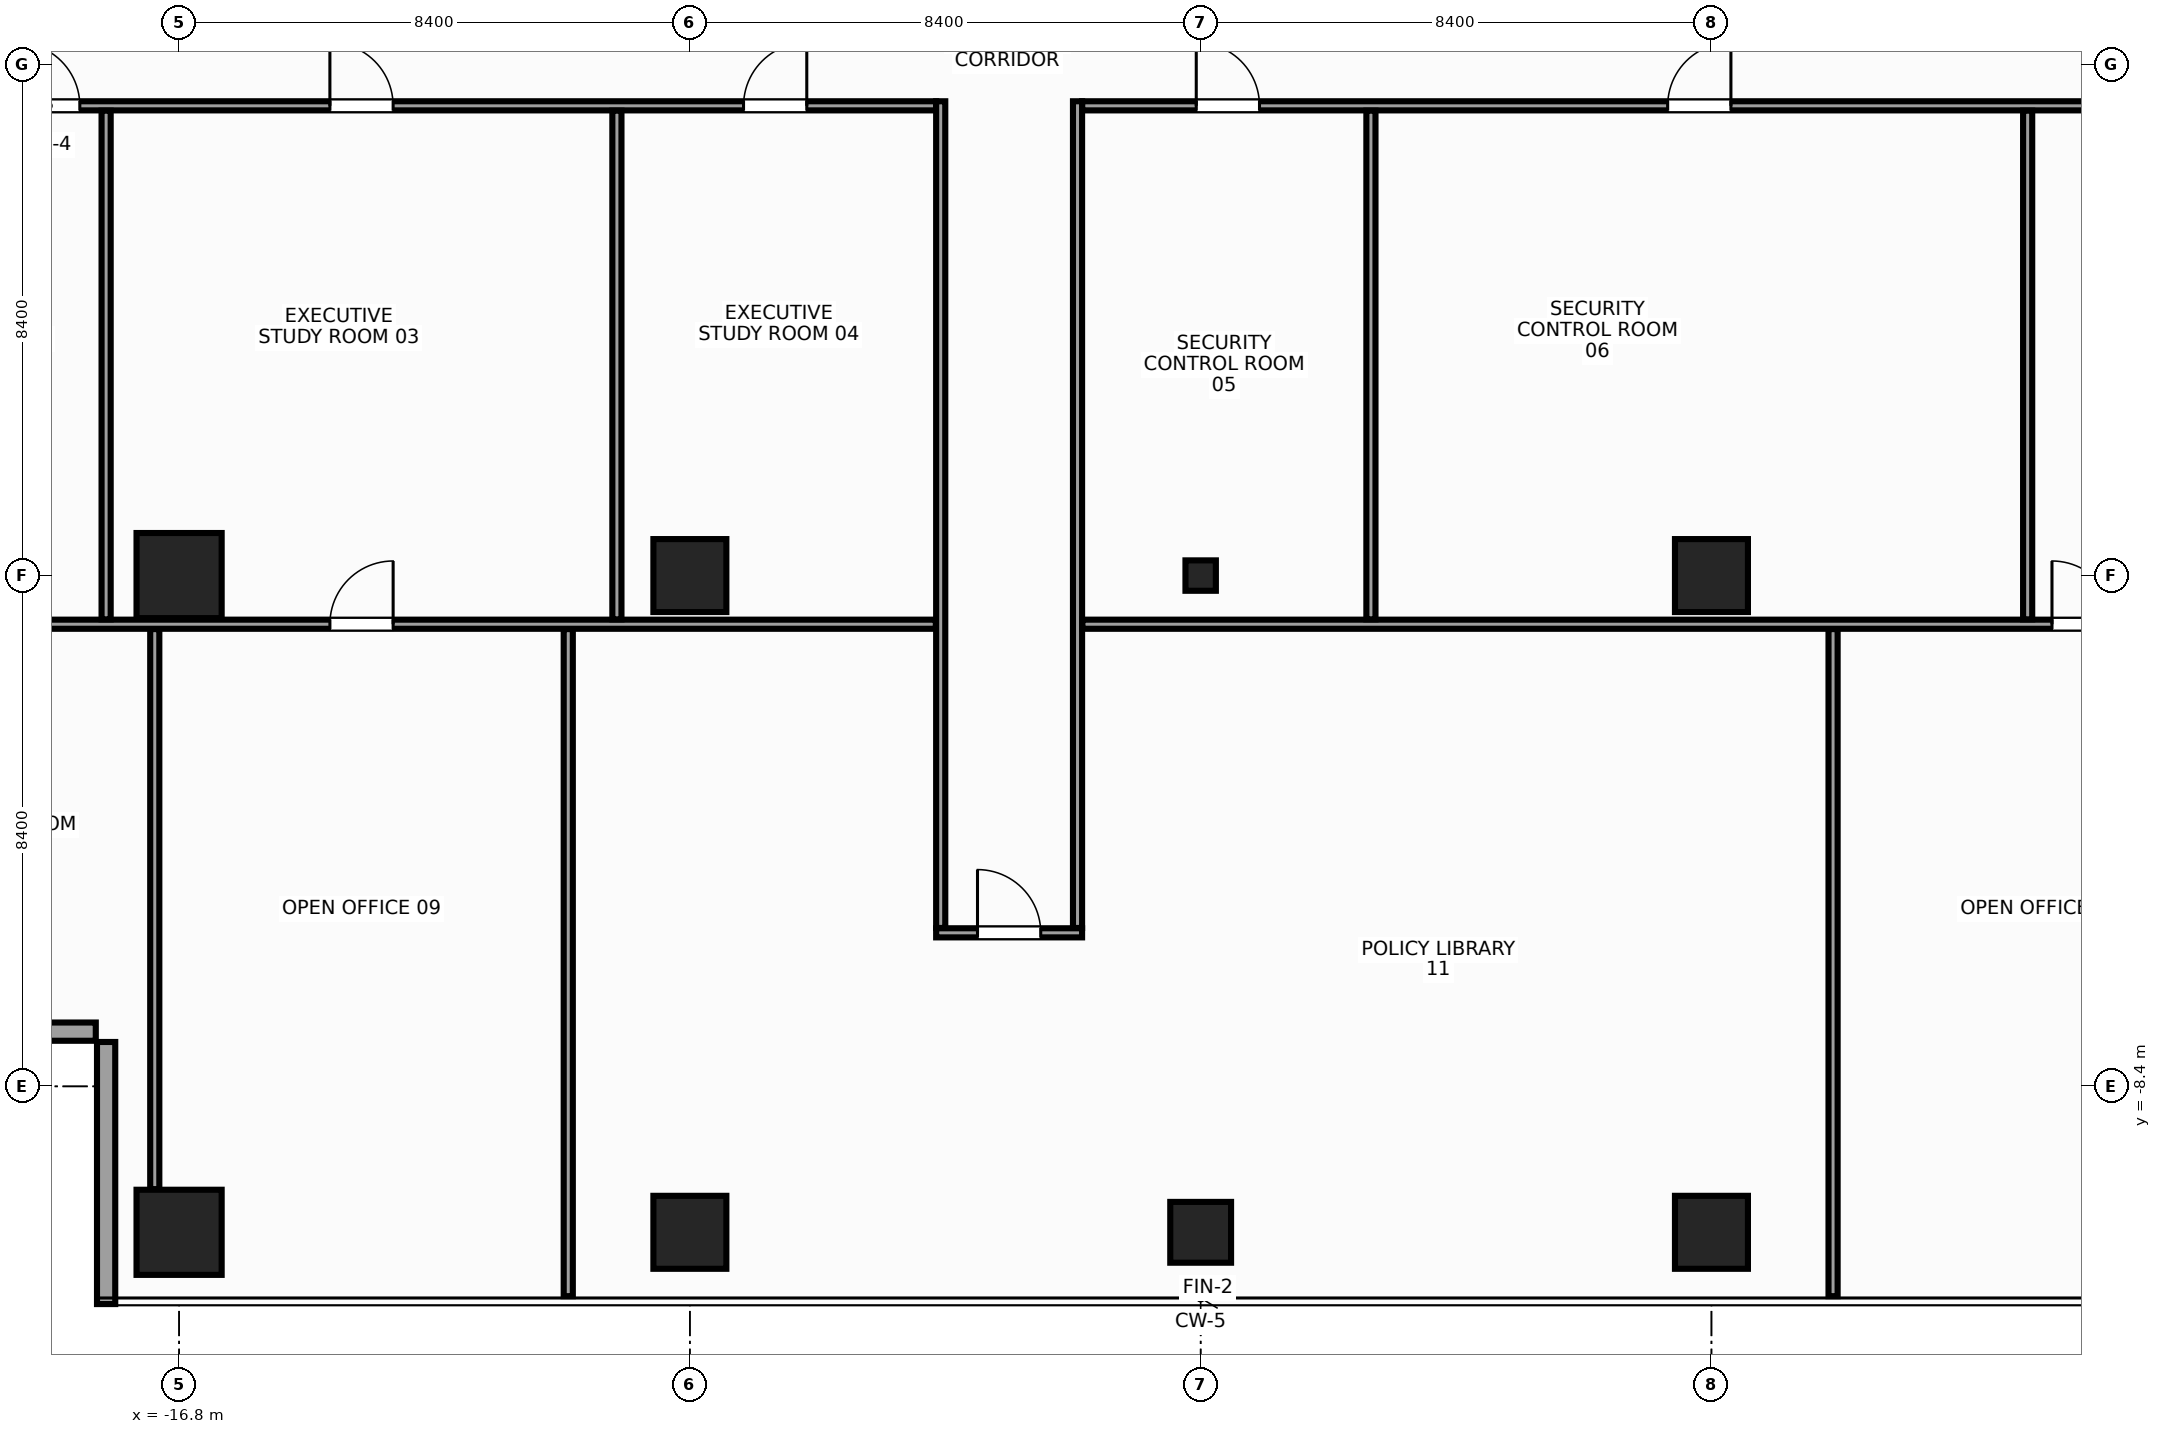
"""IFC4 building model, lengths in metres.
Left out: names, types, materials, properties, quantities, classifications, styles, units other than length and angle.
Written with IfcOpenShell. Run it as: python <this file> out.ifc"""

import sys

from ifc_helpers import new_model, si_unit, direction, frame, frame_2d, origin, origin_with_axes, origin_2d, place, context, subcontext, project, spatial, rectangle, hollow_rectangle, extrude, source, transform, mapped, element, fill, save


model = new_model("IFC4")
c1 = context("Model", 3, precision=1e-05, world=origin(), true_north=direction((0.0, 1.0)))
c2 = subcontext(c1, "Body", "Model", "MODEL_VIEW")
j1 = project(units=[si_unit("LENGTHUNIT", "METRE"), si_unit("PLANEANGLEUNIT", "RADIAN")], contexts=[c1])
p1 = place(None, origin())
s1 = spatial("IfcSite", under=j1, at=p1, CompositionType="ELEMENT")
p2 = place(p1, origin())
s2 = spatial("IfcBuilding", under=s1, at=p2, CompositionType="ELEMENT")
p3 = place(p2, frame((0.0, 0.0, 246.8)))
s3 = spatial("IfcBuildingStorey", under=s2, at=p3, CompositionType="ELEMENT", Elevation=246.8)
m1 = source(origin(), c2, "Body", "SweptSolid", [
    extrude(rectangle(XDim=1.4, YDim=1.4, at=origin_2d()), origin(), (0.0, 0.0, 1.0), 3.6),
])
for number, where, z_axis, x_axis in (
    (1, (-16.8, -10.8, 0.0), (0.0, 0.0, 1.0), (1.0, 0.0, 0.0)),
    (2, (-16.8, 0.0, 0.0), (0.0, 0.0, 1.0), (1.0, 0.0, 0.0)),
):
    element("IfcColumn", number, at=place(p3, frame(where, z_axis=z_axis, x_axis=x_axis)), inside=s3, PredefinedType="COLUMN", context=c2, shape_type="MappedRepresentation", body=[
        mapped(m1, transform((0.0, 0.0, 0.0), x_axis=(1.0, 0.0, 0.0), y_axis=(0.0, 1.0, 0.0), z_axis=(0.0, 0.0, 1.0), scale=1.0)),
    ])
m2 = source(origin(), c2, "Body", "SweptSolid", [
    extrude(rectangle(XDim=1.2, YDim=1.2, at=origin_2d()), origin(), (0.0, 0.0, 1.0), 3.6),
])
for number, where, z_axis, x_axis in (
    (3, (-8.4, 0.0, 0.0), (0.0, 0.0, 1.0), (1.0, 0.0, 0.0)),
    (4, (-8.4, -10.8, 0.0), (0.0, 0.0, 1.0), (1.0, 0.0, 0.0)),
    (5, (8.4, 0.0, 0.0), (0.0, 0.0, 1.0), (1.0, 0.0, 0.0)),
    (6, (8.4, -10.8, 0.0), (0.0, 0.0, 1.0), (1.0, 0.0, 0.0)),
):
    element("IfcColumn", number, at=place(p3, frame(where, z_axis=z_axis, x_axis=x_axis)), inside=s3, PredefinedType="COLUMN", context=c2, shape_type="MappedRepresentation", body=[
        mapped(m2, transform((0.0, 0.0, 0.0), x_axis=(1.0, 0.0, 0.0), y_axis=(0.0, 1.0, 0.0), z_axis=(0.0, 0.0, 1.0), scale=1.0)),
    ])
m3 = source(origin(), c2, "Body", "SweptSolid", [
    extrude(rectangle(XDim=1.0, YDim=1.0, at=origin_2d()), origin(), (0.0, 0.0, 1.0), 3.6),
])
p4 = place(p3, frame((0.0, -10.8, 0.0), z_axis=(0.0, 0.0, 1.0), x_axis=(1.0, 0.0, 0.0)))
e7 = element("IfcColumn", 7, at=p4, inside=s3, PredefinedType="COLUMN", context=c2, shape_type="MappedRepresentation", body=[
    mapped(m3, transform((0.0, 0.0, 0.0), x_axis=(1.0, 0.0, 0.0), y_axis=(0.0, 1.0, 0.0), z_axis=(0.0, 0.0, 1.0), scale=1.0)),
])
m4 = source(origin(), c2, "Body", "SweptSolid", [
    extrude(hollow_rectangle(XDim=0.5, YDim=0.5, WallThickness=0.025, at=origin_2d()), origin(), (0.0, 0.0, 1.0), 3.6),
])
p5 = place(p3, origin_with_axes())
e8 = element("IfcColumn", 8, at=p5, inside=s3, PredefinedType="COLUMN", context=c2, shape_type="MappedRepresentation", body=[
    mapped(m4, transform((0.0, 0.0, 0.0), x_axis=(1.0, 0.0, 0.0), y_axis=(0.0, 1.0, 0.0), z_axis=(0.0, 0.0, 1.0), scale=1.0)),
])
m5 = source(origin(), c2, "Body", "SweptSolid", [
    extrude(rectangle(XDim=4.31, YDim=0.3, at=frame_2d((2.155, 0.0))), origin(), (0.0, 0.0, 1.0), 2.75),
])
for number, where, z_axis, x_axis in (
    (9, (-22.48, -7.5, 0.0), (0.0, 0.0, 1.0), (1.0, 0.0, 0.0)),
    (10, (-18.0, -7.67, 0.0), (0.0, 0.0, 1.0), (0.0, -1.0, 0.0)),
):
    element("IfcWall", number, at=place(p3, frame(where, z_axis=z_axis, x_axis=x_axis)), inside=s3, PredefinedType="STANDARD", context=c2, shape_type="MappedRepresentation", body=[
        mapped(m5, transform((0.0, 0.0, 0.0), x_axis=(1.0, 0.0, 0.0), y_axis=(0.0, 1.0, 0.0), z_axis=(0.0, 0.0, 1.0), scale=1.0)),
    ])
m6 = source(origin(), c2, "Body", "SweptSolid", [
    extrude(rectangle(XDim=15.6, YDim=0.15, at=frame_2d((7.8, 0.0))), origin(), (0.0, 0.0, 1.0), 2.755),
])
p6 = place(p3, frame((-19.95, 7.725, 0.0), z_axis=(0.0, 0.0, 1.0), x_axis=(1.0, 0.0, 0.0)))
e11 = element("IfcWall", 11, at=p6, inside=s3, PredefinedType="PARTITIONING", context=c2, shape_type="MappedRepresentation", body=[
    mapped(m6, transform((0.0, 0.0, 0.0), x_axis=(1.0, 0.0, 0.0), y_axis=(0.0, 1.0, 0.0), z_axis=(0.0, 0.0, 1.0), scale=1.0)),
])
p7 = place(p6, frame((0.478, 0.0, 0.0)))
e12 = element("IfcOpeningElement", 12, at=p7, cuts=e11, PredefinedType="OPENING", context=c2, shape_type="SweptSolid", body=[
    extrude(rectangle(XDim=1.04, YDim=2.2, at=frame_2d((0.52, 1.1))), frame((0.0, 0.087, 0.0), z_axis=(0.0, -1.0, 0.0), x_axis=(1.0, 0.0, 0.0)), (0.0, 0.0, 1.0), 0.174),
])
p8 = place(p6, frame((5.63, 0.0, 0.0)))
e13 = element("IfcOpeningElement", 13, at=p8, cuts=e11, PredefinedType="OPENING", context=c2, shape_type="SweptSolid", body=[
    extrude(rectangle(XDim=1.04, YDim=2.2, at=frame_2d((0.52, 1.1))), frame((0.0, 0.087, 0.0), z_axis=(0.0, -1.0, 0.0), x_axis=(1.0, 0.0, 0.0)), (0.0, 0.0, 1.0), 0.174),
])
p9 = place(p6, frame((12.433, 0.0, 0.0)))
e14 = element("IfcOpeningElement", 14, at=p9, cuts=e11, PredefinedType="OPENING", context=c2, shape_type="SweptSolid", body=[
    extrude(rectangle(XDim=1.04, YDim=2.2, at=frame_2d((0.52, 1.1))), frame((0.0, 0.087, 0.0), z_axis=(0.0, -1.0, 0.0), x_axis=(1.0, 0.0, 0.0)), (0.0, 0.0, 1.0), 0.174),
])
m7 = source(origin(), c2, "Body", "SweptSolid", [
    extrude(rectangle(XDim=21.9, YDim=0.15, at=frame_2d((10.95, 0.0))), origin(), (0.0, 0.0, 1.0), 2.755),
])
p10 = place(p3, frame((-1.95, 7.725, 0.0), z_axis=(0.0, 0.0, 1.0), x_axis=(1.0, 0.0, 0.0)))
e15 = element("IfcWall", 15, at=p10, inside=s3, PredefinedType="PARTITIONING", context=c2, shape_type="MappedRepresentation", body=[
    mapped(m7, transform((0.0, 0.0, 0.0), x_axis=(1.0, 0.0, 0.0), y_axis=(0.0, 1.0, 0.0), z_axis=(0.0, 0.0, 1.0), scale=1.0)),
])
p11 = place(p10, frame((17.742, 0.0, 0.0)))
e16 = element("IfcOpeningElement", 16, at=p11, cuts=e15, PredefinedType="OPENING", context=c2, shape_type="SweptSolid", body=[
    extrude(rectangle(XDim=1.04, YDim=2.2, at=frame_2d((0.52, 1.1))), frame((0.0, 0.087, 0.0), z_axis=(0.0, -1.0, 0.0), x_axis=(1.0, 0.0, 0.0)), (0.0, 0.0, 1.0), 0.174),
])
p12 = place(p10, frame((1.877, 0.0, 0.0)))
e17 = element("IfcOpeningElement", 17, at=p12, cuts=e15, PredefinedType="OPENING", context=c2, shape_type="SweptSolid", body=[
    extrude(rectangle(XDim=1.04, YDim=2.2, at=frame_2d((0.52, 1.1))), frame((0.0, 0.087, 0.0), z_axis=(0.0, -1.0, 0.0), x_axis=(1.0, 0.0, 0.0)), (0.0, 0.0, 1.0), 0.174),
])
p13 = place(p10, frame((9.63, 0.0, 0.0)))
e18 = element("IfcOpeningElement", 18, at=p13, cuts=e15, PredefinedType="OPENING", context=c2, shape_type="SweptSolid", body=[
    extrude(rectangle(XDim=1.04, YDim=2.2, at=frame_2d((0.52, 1.1))), frame((0.0, 0.087, 0.0), z_axis=(0.0, -1.0, 0.0), x_axis=(1.0, 0.0, 0.0)), (0.0, 0.0, 1.0), 0.174),
])
m8 = source(origin(), c2, "Body", "SweptSolid", [
    extrude(rectangle(XDim=2.4, YDim=0.15, at=frame_2d((1.2, 0.0))), origin(), (0.0, 0.0, 1.0), 3.37),
])
p14 = place(p3, frame((-4.35, -5.875, 0.0), z_axis=(0.0, 0.0, 1.0), x_axis=(1.0, 0.0, 0.0)))
e19 = element("IfcWall", 19, at=p14, inside=s3, PredefinedType="PARTITIONING", context=c2, shape_type="MappedRepresentation", body=[
    mapped(m8, transform((0.0, 0.0, 0.0), x_axis=(1.0, 0.0, 0.0), y_axis=(0.0, 1.0, 0.0), z_axis=(0.0, 0.0, 1.0), scale=1.0)),
])
p15 = place(p14, frame((0.68, 0.0, 0.0)))
e20 = element("IfcOpeningElement", 20, at=p15, cuts=e19, PredefinedType="OPENING", context=c2, shape_type="SweptSolid", body=[
    extrude(rectangle(XDim=1.04, YDim=2.2, at=frame_2d((0.52, 1.1))), frame((0.0, 0.087, 0.0), z_axis=(0.0, -1.0, 0.0), x_axis=(1.0, 0.0, 0.0)), (0.0, 0.0, 1.0), 0.174),
])
m9 = source(origin(), c2, "Body", "SweptSolid", [
    extrude(rectangle(XDim=13.595, YDim=0.15, at=frame_2d((6.797, 0.0))), origin(), (0.0, 0.0, 1.0), 2.655),
])
for number, where, z_axis, x_axis in (
    (21, (-4.275, -5.795, 0.0), (0.0, 0.0, 1.0), (0.0, 1.0, 0.0)),
    (22, (-2.025, -5.795, 0.0), (0.0, 0.0, 1.0), (0.0, 1.0, 0.0)),
):
    element("IfcWall", number, at=place(p3, frame(where, z_axis=z_axis, x_axis=x_axis)), inside=s3, PredefinedType="PARTITIONING", context=c2, shape_type="MappedRepresentation", body=[
        mapped(m9, transform((0.0, 0.0, 0.0), x_axis=(1.0, 0.0, 0.0), y_axis=(0.0, 1.0, 0.0), z_axis=(0.0, 0.0, 1.0), scale=1.0)),
    ])
m10 = source(origin(), c2, "Body", "SweptSolid", [
    extrude(rectangle(XDim=17.995, YDim=0.15, at=frame_2d((8.998, 0.0))), origin(), (0.0, 0.0, 1.0), 2.755),
])
p16 = place(p3, frame((-22.35, -0.8, 0.0), z_axis=(0.0, 0.0, 1.0), x_axis=(1.0, 0.0, 0.0)))
e23 = element("IfcWall", 23, at=p16, inside=s3, PredefinedType="PARTITIONING", context=c2, shape_type="MappedRepresentation", body=[
    mapped(m10, transform((0.0, 0.0, 0.0), x_axis=(1.0, 0.0, 0.0), y_axis=(0.0, 1.0, 0.0), z_axis=(0.0, 0.0, 1.0), scale=1.0)),
])
p17 = place(p16, frame((1.018, 0.0, 0.0)))
e24 = element("IfcOpeningElement", 24, at=p17, cuts=e23, PredefinedType="OPENING", context=c2, shape_type="SweptSolid", body=[
    extrude(rectangle(XDim=1.04, YDim=2.2, at=frame_2d((0.52, 1.1))), frame((0.0, 0.087, 0.0), z_axis=(0.0, -1.0, 0.0), x_axis=(1.0, 0.0, 0.0)), (0.0, 0.0, 1.0), 0.174),
])
p18 = place(p16, frame((8.03, 0.0, 0.0)))
e25 = element("IfcOpeningElement", 25, at=p18, cuts=e23, PredefinedType="OPENING", context=c2, shape_type="SweptSolid", body=[
    extrude(rectangle(XDim=1.04, YDim=2.2, at=frame_2d((0.52, 1.1))), frame((0.0, 0.087, 0.0), z_axis=(0.0, -1.0, 0.0), x_axis=(1.0, 0.0, 0.0)), (0.0, 0.0, 1.0), 0.174),
])
m11 = source(origin(), c2, "Body", "SweptSolid", [
    extrude(rectangle(XDim=24.295, YDim=0.15, at=frame_2d((12.147, 0.0))), origin(), (0.0, 0.0, 1.0), 2.755),
])
p19 = place(p3, frame((-1.945, -0.8, 0.0), z_axis=(0.0, 0.0, 1.0), x_axis=(1.0, 0.0, 0.0)))
e26 = element("IfcWall", 26, at=p19, inside=s3, PredefinedType="PARTITIONING", context=c2, shape_type="MappedRepresentation", body=[
    mapped(m11, transform((0.0, 0.0, 0.0), x_axis=(1.0, 0.0, 0.0), y_axis=(0.0, 1.0, 0.0), z_axis=(0.0, 0.0, 1.0), scale=1.0)),
])
p20 = place(p19, frame((22.278, 0.0, 0.0)))
e27 = element("IfcOpeningElement", 27, at=p20, cuts=e26, PredefinedType="OPENING", context=c2, shape_type="SweptSolid", body=[
    extrude(rectangle(XDim=1.04, YDim=2.2, at=frame_2d((0.52, 1.1))), frame((0.0, 0.087, 0.0), z_axis=(0.0, -1.0, 0.0), x_axis=(1.0, 0.0, 0.0)), (0.0, 0.0, 1.0), 0.174),
])
p21 = place(p19, frame((15.945, 0.0, 0.0)))
e28 = element("IfcOpeningElement", 28, at=p21, cuts=e26, PredefinedType="OPENING", context=c2, shape_type="SweptSolid", body=[
    extrude(rectangle(XDim=1.04, YDim=2.2, at=frame_2d((0.52, 1.1))), frame((0.0, 0.087, 0.0), z_axis=(0.0, -1.0, 0.0), x_axis=(1.0, 0.0, 0.0)), (0.0, 0.0, 1.0), 0.174),
])
m12 = source(origin(), c2, "Body", "SweptSolid", [
    extrude(rectangle(XDim=8.365, YDim=0.15, at=frame_2d((4.183, 0.0))), origin(), (0.0, 0.0, 1.0), 3.37),
])
p22 = place(p3, frame((-18.0, -0.72, 0.0), z_axis=(0.0, 0.0, 1.0), x_axis=(0.0, 1.0, 0.0)))
e29 = element("IfcWall", 29, at=p22, inside=s3, PredefinedType="PARTITIONING", context=c2, shape_type="MappedRepresentation", body=[
    mapped(m12, transform((0.0, 0.0, 0.0), x_axis=(1.0, 0.0, 0.0), y_axis=(0.0, 1.0, 0.0), z_axis=(0.0, 0.0, 1.0), scale=1.0)),
])
m13 = source(origin(), c2, "Body", "SweptSolid", [
    extrude(rectangle(XDim=8.365, YDim=0.15, at=frame_2d((4.183, 0.0))), origin(), (0.0, 0.0, 1.0), 2.655),
])
for number, where, z_axis, x_axis in (
    (30, (-9.6, -0.72, 0.0), (0.0, 0.0, 1.0), (0.0, 1.0, 0.0)),
    (31, (2.8, -0.72, 0.0), (0.0, 0.0, 1.0), (0.0, 1.0, 0.0)),
    (32, (13.6, -0.72, 0.0), (0.0, 0.0, 1.0), (0.0, 1.0, 0.0)),
):
    element("IfcWall", number, at=place(p3, frame(where, z_axis=z_axis, x_axis=x_axis)), inside=s3, PredefinedType="PARTITIONING", context=c2, shape_type="MappedRepresentation", body=[
        mapped(m13, transform((0.0, 0.0, 0.0), x_axis=(1.0, 0.0, 0.0), y_axis=(0.0, 1.0, 0.0), z_axis=(0.0, 0.0, 1.0), scale=1.0)),
    ])
m14 = source(origin(), c2, "Body", "SweptSolid", [
    extrude(rectangle(XDim=9.21, YDim=0.15, at=frame_2d((4.605, 0.0))), origin(), (0.0, 0.0, 1.0), 3.37),
])
p23 = place(p3, frame((-17.2, -10.09, 0.0), z_axis=(0.0, 0.0, 1.0), x_axis=(0.0, 1.0, 0.0)))
e33 = element("IfcWall", 33, at=p23, inside=s3, PredefinedType="PARTITIONING", context=c2, shape_type="MappedRepresentation", body=[
    mapped(m14, transform((0.0, 0.0, 0.0), x_axis=(1.0, 0.0, 0.0), y_axis=(0.0, 1.0, 0.0), z_axis=(0.0, 0.0, 1.0), scale=1.0)),
])
m15 = source(origin(), c2, "Body", "SweptSolid", [
    extrude(rectangle(XDim=10.97, YDim=0.15, at=frame_2d((5.485, 0.0))), origin(), (0.0, 0.0, 1.0), 2.905),
])
for number, where, z_axis, x_axis in (
    (34, (-10.4, -11.85, 0.0), (0.0, 0.0, 1.0), (0.0, 1.0, 0.0)),
    (35, (10.4, -11.85, 0.0), (0.0, 0.0, 1.0), (0.0, 1.0, 0.0)),
):
    element("IfcWall", number, at=place(p3, frame(where, z_axis=z_axis, x_axis=x_axis)), inside=s3, PredefinedType="PARTITIONING", context=c2, shape_type="MappedRepresentation", body=[
        mapped(m15, transform((0.0, 0.0, 0.0), x_axis=(1.0, 0.0, 0.0), y_axis=(0.0, 1.0, 0.0), z_axis=(0.0, 0.0, 1.0), scale=1.0)),
    ])
m16 = source(origin(), c2, "Body", "SweptSolid", [
    extrude(rectangle(XDim=1.04, YDim=2.2, at=frame_2d((0.52, 1.1))), frame((0.0, 0.025, 0.0), z_axis=(0.0, -1.0, 0.0), x_axis=(1.0, 0.0, 0.0)), (0.0, 0.0, 1.0), 0.05),
])
p24 = place(p7, origin())
e36 = element("IfcDoor", 36, at=p24, inside=s3, OperationType="SINGLE_SWING_LEFT", PredefinedType="DOOR", context=c2, shape_type="MappedRepresentation", body=[
    mapped(m16, transform((0.0, 0.0, 0.0), x_axis=(1.0, 0.0, 0.0), y_axis=(0.0, 1.0, 0.0), z_axis=(0.0, 0.0, 1.0), scale=1.0)),
])
fill(e12, e36)
p25 = place(p8, origin())
e37 = element("IfcDoor", 37, at=p25, inside=s3, OperationType="SINGLE_SWING_LEFT", PredefinedType="DOOR", context=c2, shape_type="MappedRepresentation", body=[
    mapped(m16, transform((0.0, 0.0, 0.0), x_axis=(1.0, 0.0, 0.0), y_axis=(0.0, 1.0, 0.0), z_axis=(0.0, 0.0, 1.0), scale=1.0)),
])
fill(e13, e37)
p26 = place(p9, origin())
e38 = element("IfcDoor", 38, at=p26, inside=s3, OperationType="SINGLE_SWING_RIGHT", PredefinedType="DOOR", context=c2, shape_type="MappedRepresentation", body=[
    mapped(m16, transform((0.0, 0.0, 0.0), x_axis=(1.0, 0.0, 0.0), y_axis=(0.0, 1.0, 0.0), z_axis=(0.0, 0.0, 1.0), scale=1.0)),
])
fill(e14, e38)
p27 = place(p12, origin())
e39 = element("IfcDoor", 39, at=p27, inside=s3, OperationType="SINGLE_SWING_LEFT", PredefinedType="DOOR", context=c2, shape_type="MappedRepresentation", body=[
    mapped(m16, transform((0.0, 0.0, 0.0), x_axis=(1.0, 0.0, 0.0), y_axis=(0.0, 1.0, 0.0), z_axis=(0.0, 0.0, 1.0), scale=1.0)),
])
fill(e17, e39)
p28 = place(p13, origin())
e40 = element("IfcDoor", 40, at=p28, inside=s3, OperationType="SINGLE_SWING_RIGHT", PredefinedType="DOOR", context=c2, shape_type="MappedRepresentation", body=[
    mapped(m16, transform((0.0, 0.0, 0.0), x_axis=(1.0, 0.0, 0.0), y_axis=(0.0, 1.0, 0.0), z_axis=(0.0, 0.0, 1.0), scale=1.0)),
])
fill(e18, e40)
p29 = place(p15, origin())
e41 = element("IfcDoor", 41, at=p29, inside=s3, OperationType="SINGLE_SWING_LEFT", PredefinedType="DOOR", context=c2, shape_type="MappedRepresentation", body=[
    mapped(m16, transform((0.0, 0.0, 0.0), x_axis=(1.0, 0.0, 0.0), y_axis=(0.0, 1.0, 0.0), z_axis=(0.0, 0.0, 1.0), scale=1.0)),
])
fill(e20, e41)
p30 = place(p18, origin())
e42 = element("IfcDoor", 42, at=p30, inside=s3, OperationType="SINGLE_SWING_RIGHT", PredefinedType="DOOR", context=c2, shape_type="MappedRepresentation", body=[
    mapped(m16, transform((0.0, 0.0, 0.0), x_axis=(1.0, 0.0, 0.0), y_axis=(0.0, 1.0, 0.0), z_axis=(0.0, 0.0, 1.0), scale=1.0)),
])
fill(e25, e42)
p31 = place(p21, origin())
e43 = element("IfcDoor", 43, at=p31, inside=s3, OperationType="SINGLE_SWING_LEFT", PredefinedType="DOOR", context=c2, shape_type="MappedRepresentation", body=[
    mapped(m16, transform((0.0, 0.0, 0.0), x_axis=(1.0, 0.0, 0.0), y_axis=(0.0, 1.0, 0.0), z_axis=(0.0, 0.0, 1.0), scale=1.0)),
])
fill(e28, e43)
save(model, sys.argv[1])
